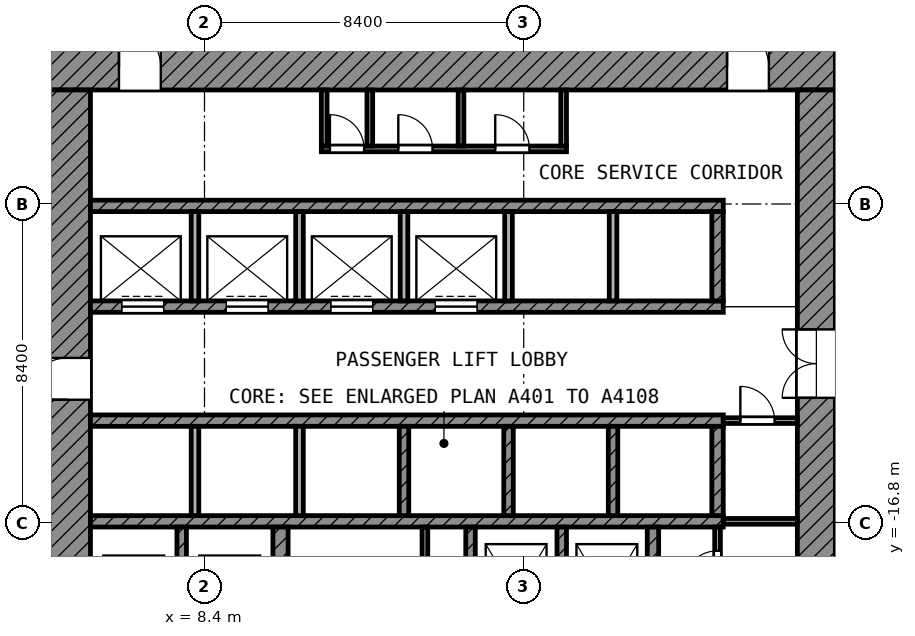
"""IFC4 building model, lengths in metres.
Left out: names, types, materials, properties, quantities, classifications, styles, units other than length and angle.
Written with IfcOpenShell. Run it as: python <this file> out.ifc"""

import sys

from ifc_helpers import new_model, si_unit, direction, frame, frame_2d, origin, place, context, subcontext, project, spatial, rectangle, extrude, element, fill, save


model = new_model("IFC4")
c1 = context("Model", 3, precision=1e-05, world=origin(), true_north=direction((0.0, 1.0)))
c2 = subcontext(c1, "Body", "Model", "MODEL_VIEW")
j1 = project(units=[si_unit("LENGTHUNIT", "METRE"), si_unit("PLANEANGLEUNIT", "RADIAN")], contexts=[c1])
p1 = place(None, origin())
s1 = spatial("IfcSite", under=j1, at=p1, CompositionType="ELEMENT")
p2 = place(p1, origin())
s2 = spatial("IfcBuilding", under=s1, at=p2, CompositionType="ELEMENT")
p3 = place(p2, frame((0.0, 0.0, 93.8)))
s3 = spatial("IfcBuildingStorey", under=s2, at=p3, CompositionType="ELEMENT", Elevation=93.8)
p4 = place(p3, frame((5.45, -0.55, 0.0), z_axis=(0.0, 0.0, 1.0), x_axis=(-0.707106781187, -0.707106781187, 0.0)))
e1 = element("IfcWall", 1, at=p4, inside=s3, PredefinedType="SOLIDWALL", context=c2, shape_type="SweptSolid", body=[
    extrude(rectangle(XDim=6.929, YDim=0.25, at=frame_2d((3.465, 0.0))), origin(), (0.0, 0.0, 1.0), 3.0),
])
p5 = place(p3, frame((4.2, -4.8, 0.0), z_axis=(0.0, 0.0, 1.0), x_axis=(1.0, 0.0, 0.0)))
e2 = element("IfcWall", 2, at=p5, inside=s3, PredefinedType="SHEAR", context=c2, shape_type="SweptSolid", body=[
    extrude(rectangle(XDim=20.8, YDim=1.2, at=frame_2d((10.4, 0.0))), origin(), (0.0, 0.0, 1.0), 4.4),
])
p6 = place(p5, frame((1.95, 0.0, 0.0)))
e3 = element("IfcOpeningElement", 3, at=p6, cuts=e2, PredefinedType="OPENING", context=c2, shape_type="SweptSolid", body=[
    extrude(rectangle(XDim=1.1, YDim=2.1, at=frame_2d((0.55, 1.05))), frame((0.0, 0.61, 0.0), z_axis=(0.0, -1.0, 0.0), x_axis=(1.0, 0.0, 0.0)), (0.0, 0.0, 1.0), 1.22),
])
p7 = place(p5, frame((17.95, 0.0, 0.0)))
e4 = element("IfcOpeningElement", 4, at=p7, cuts=e2, PredefinedType="OPENING", context=c2, shape_type="SweptSolid", body=[
    extrude(rectangle(XDim=1.1, YDim=2.1, at=frame_2d((0.55, 1.05))), frame((0.0, 0.61, 0.0), z_axis=(0.0, -1.0, 0.0), x_axis=(1.0, 0.0, 0.0)), (0.0, 0.0, 1.0), 1.22),
])
p8 = place(p3, frame((4.8, -25.0, 0.0), z_axis=(0.0, 0.0, 1.0), x_axis=(0.0, 1.0, 0.0)))
e5 = element("IfcWall", 5, at=p8, inside=s3, PredefinedType="SHEAR", context=c2, shape_type="SweptSolid", body=[
    extrude(rectangle(XDim=19.6, YDim=1.2, at=frame_2d((9.8, 0.0))), origin(), (0.0, 0.0, 1.0), 4.4),
])
p9 = place(p8, frame((11.45, 0.0, 0.0)))
e6 = element("IfcOpeningElement", 6, at=p9, cuts=e5, PredefinedType="OPENING", context=c2, shape_type="SweptSolid", body=[
    extrude(rectangle(XDim=1.1, YDim=2.1, at=frame_2d((0.55, 1.05))), frame((0.0, 0.61, 0.0), z_axis=(0.0, -1.0, 0.0), x_axis=(1.0, 0.0, 0.0)), (0.0, 0.0, 1.0), 1.22),
])
p10 = place(p8, frame((2.15, 0.0, 0.0)))
e7 = element("IfcOpeningElement", 7, at=p10, cuts=e5, PredefinedType="OPENING", context=c2, shape_type="SweptSolid", body=[
    extrude(rectangle(XDim=1.1, YDim=2.1, at=frame_2d((0.55, 1.05))), frame((0.0, 0.61, 0.0), z_axis=(0.0, -1.0, 0.0), x_axis=(1.0, 0.0, 0.0)), (0.0, 0.0, 1.0), 1.22),
])
p11 = place(p3, frame((24.5, -24.0, 0.0), z_axis=(0.0, 0.0, 1.0), x_axis=(0.0, 1.0, 0.0)))
e8 = element("IfcWall", 8, at=p11, inside=s3, PredefinedType="SHEAR", context=c2, shape_type="SweptSolid", body=[
    extrude(rectangle(XDim=18.6, YDim=1.0, at=frame_2d((9.3, 0.0))), origin(), (0.0, 0.0, 1.0), 4.4),
])
p12 = place(p11, frame((10.5, 0.0, 0.0)))
e9 = element("IfcOpeningElement", 9, at=p12, cuts=e8, PredefinedType="OPENING", context=c2, shape_type="SweptSolid", body=[
    extrude(rectangle(XDim=1.8, YDim=2.1, at=frame_2d((0.9, 1.05))), frame((0.0, 0.51, 0.0), z_axis=(0.0, -1.0, 0.0), x_axis=(1.0, 0.0, 0.0)), (0.0, 0.0, 1.0), 1.02),
])
p13 = place(p3, frame((5.4, -8.45, 0.0), z_axis=(0.0, 0.0, 1.0), x_axis=(1.0, 0.0, 0.0)))
e10 = element("IfcWall", 10, at=p13, inside=s3, PredefinedType="SHEAR", context=c2, shape_type="SweptSolid", body=[
    extrude(rectangle(XDim=16.65, YDim=0.3, at=frame_2d((8.325, 0.0))), origin(), (0.0, 0.0, 1.0), 4.4),
])
p14 = place(p3, frame((5.4, -11.1, 0.0), z_axis=(0.0, 0.0, 1.0), x_axis=(1.0, 0.0, 0.0)))
e11 = element("IfcWall", 11, at=p14, inside=s3, PredefinedType="SHEAR", context=c2, shape_type="SweptSolid", body=[
    extrude(rectangle(XDim=16.65, YDim=0.3, at=frame_2d((8.325, 0.0))), origin(), (0.0, 0.0, 1.0), 4.4),
])
p15 = place(p14, frame((0.825, 0.0, 0.0)))
e12 = element("IfcOpeningElement", 12, at=p15, cuts=e11, PredefinedType="OPENING", context=c2, shape_type="SweptSolid", body=[
    extrude(rectangle(XDim=1.1, YDim=2.1, at=frame_2d((0.55, 1.05))), frame((0.0, 0.16, 0.0), z_axis=(0.0, -1.0, 0.0), x_axis=(1.0, 0.0, 0.0)), (0.0, 0.0, 1.0), 0.32),
])
p16 = place(p14, frame((3.575, 0.0, 0.0)))
e13 = element("IfcOpeningElement", 13, at=p16, cuts=e11, PredefinedType="OPENING", context=c2, shape_type="SweptSolid", body=[
    extrude(rectangle(XDim=1.1, YDim=2.1, at=frame_2d((0.55, 1.05))), frame((0.0, 0.16, 0.0), z_axis=(0.0, -1.0, 0.0), x_axis=(1.0, 0.0, 0.0)), (0.0, 0.0, 1.0), 0.32),
])
p17 = place(p14, frame((6.325, 0.0, 0.0)))
e14 = element("IfcOpeningElement", 14, at=p17, cuts=e11, PredefinedType="OPENING", context=c2, shape_type="SweptSolid", body=[
    extrude(rectangle(XDim=1.1, YDim=2.1, at=frame_2d((0.55, 1.05))), frame((0.0, 0.16, 0.0), z_axis=(0.0, -1.0, 0.0), x_axis=(1.0, 0.0, 0.0)), (0.0, 0.0, 1.0), 0.32),
])
p18 = place(p14, frame((9.075, 0.0, 0.0)))
e15 = element("IfcOpeningElement", 15, at=p18, cuts=e11, PredefinedType="OPENING", context=c2, shape_type="SweptSolid", body=[
    extrude(rectangle(XDim=1.1, YDim=2.1, at=frame_2d((0.55, 1.05))), frame((0.0, 0.16, 0.0), z_axis=(0.0, -1.0, 0.0), x_axis=(1.0, 0.0, 0.0)), (0.0, 0.0, 1.0), 0.32),
])
for number, where, z_axis, x_axis in (
    (16, (5.4, -14.1, 0.0), (0.0, 0.0, 1.0), (1.0, 0.0, 0.0)),
    (17, (5.4, -16.75, 0.0), (0.0, 0.0, 1.0), (1.0, 0.0, 0.0)),
):
    element("IfcWall", number, at=place(p3, frame(where, z_axis=z_axis, x_axis=x_axis)), inside=s3, PredefinedType="SHEAR", context=c2, shape_type="SweptSolid", body=[
        extrude(rectangle(XDim=16.65, YDim=0.3, at=frame_2d((8.325, 0.0))), origin(), (0.0, 0.0, 1.0), 4.4),
    ])
p19 = place(p3, frame((10.4, -20.05, 0.0), z_axis=(0.0, 0.0, 1.0), x_axis=(0.0, 1.0, 0.0)))
e18 = element("IfcWall", 18, at=p19, inside=s3, PredefinedType="SHEAR", context=c2, shape_type="SweptSolid", body=[
    extrude(rectangle(XDim=3.15, YDim=0.4, at=frame_2d((1.575, 0.0))), origin(), (0.0, 0.0, 1.0), 4.4),
])
p20 = place(p3, frame((20.2, -20.35, 0.0), z_axis=(0.0, 0.0, 1.0), x_axis=(0.0, 1.0, 0.0)))
e19 = element("IfcWall", 19, at=p20, inside=s3, PredefinedType="SHEAR", context=c2, shape_type="SweptSolid", body=[
    extrude(rectangle(XDim=3.45, YDim=0.3, at=frame_2d((1.725, 0.0))), origin(), (0.0, 0.0, 1.0), 4.4),
])
p21 = place(p3, frame((21.9, -10.95, 0.0), z_axis=(0.0, 0.0, 1.0), x_axis=(0.0, 1.0, 0.0)))
e20 = element("IfcWall", 20, at=p21, inside=s3, PredefinedType="SHEAR", context=c2, shape_type="SweptSolid", body=[
    extrude(rectangle(XDim=2.35, YDim=0.3, at=frame_2d((1.175, 0.0))), origin(), (0.0, 0.0, 1.0), 4.4),
])
p22 = place(p3, frame((21.9, -16.6, 0.0), z_axis=(0.0, 0.0, 1.0), x_axis=(0.0, 1.0, 0.0)))
e21 = element("IfcWall", 21, at=p22, inside=s3, PredefinedType="SHEAR", context=c2, shape_type="SweptSolid", body=[
    extrude(rectangle(XDim=2.35, YDim=0.3, at=frame_2d((1.175, 0.0))), origin(), (0.0, 0.0, 1.0), 4.4),
])
for number, where, z_axis, x_axis in (
    (22, (7.8, -20.05, 0.0), (0.0, 0.0, 1.0), (0.0, 1.0, 0.0)),
    (23, (15.4, -20.05, 0.0), (0.0, 0.0, 1.0), (0.0, 1.0, 0.0)),
    (24, (17.8, -20.05, 0.0), (0.0, 0.0, 1.0), (0.0, 1.0, 0.0)),
):
    element("IfcWall", number, at=place(p3, frame(where, z_axis=z_axis, x_axis=x_axis)), inside=s3, PredefinedType="SHEAR", context=c2, shape_type="SweptSolid", body=[
        extrude(rectangle(XDim=3.15, YDim=0.25, at=frame_2d((1.575, 0.0))), origin(), (0.0, 0.0, 1.0), 4.4),
    ])
for number, where, z_axis, x_axis in (
    (25, (8.15, -10.95, 0.0), (0.0, 0.0, 1.0), (0.0, 1.0, 0.0)),
    (26, (10.9, -10.95, 0.0), (0.0, 0.0, 1.0), (0.0, 1.0, 0.0)),
    (27, (13.65, -10.95, 0.0), (0.0, 0.0, 1.0), (0.0, 1.0, 0.0)),
    (28, (16.4, -10.95, 0.0), (0.0, 0.0, 1.0), (0.0, 1.0, 0.0)),
    (29, (19.15, -10.95, 0.0), (0.0, 0.0, 1.0), (0.0, 1.0, 0.0)),
):
    element("IfcWall", number, at=place(p3, frame(where, z_axis=z_axis, x_axis=x_axis)), inside=s3, PredefinedType="PARTITIONING", context=c2, shape_type="SweptSolid", body=[
        extrude(rectangle(XDim=2.35, YDim=0.2, at=frame_2d((1.175, 0.0))), origin(), (0.0, 0.0, 1.0), 4.4),
    ])
for number, where, z_axis, x_axis in (
    (30, (8.15, -16.6, 0.0), (0.0, 0.0, 1.0), (0.0, 1.0, 0.0)),
    (31, (10.9, -16.6, 0.0), (0.0, 0.0, 1.0), (0.0, 1.0, 0.0)),
):
    element("IfcWall", number, at=place(p3, frame(where, z_axis=z_axis, x_axis=x_axis)), inside=s3, PredefinedType="PARTITIONING", context=c2, shape_type="SweptSolid", body=[
        extrude(rectangle(XDim=2.35, YDim=0.2, at=frame_2d((1.175, 0.0))), origin(), (0.0, 0.0, 1.0), 4.4),
    ])
for number, where, z_axis, x_axis in (
    (32, (13.65, -16.6, 0.0), (0.0, 0.0, 1.0), (0.0, 1.0, 0.0)),
    (33, (16.4, -16.6, 0.0), (0.0, 0.0, 1.0), (0.0, 1.0, 0.0)),
    (34, (19.15, -16.6, 0.0), (0.0, 0.0, 1.0), (0.0, 1.0, 0.0)),
):
    element("IfcWall", number, at=place(p3, frame(where, z_axis=z_axis, x_axis=x_axis)), inside=s3, PredefinedType="SHEAR", context=c2, shape_type="SweptSolid", body=[
        extrude(rectangle(XDim=2.35, YDim=0.25, at=frame_2d((1.175, 0.0))), origin(), (0.0, 0.0, 1.0), 4.4),
    ])
p23 = place(p3, frame((21.9, -19.05, 0.0), z_axis=(0.0, 0.0, 1.0), x_axis=(0.0, 1.0, 0.0)))
e35 = element("IfcWall", 35, at=p23, inside=s3, PredefinedType="PARTITIONING", context=c2, shape_type="SweptSolid", body=[
    extrude(rectangle(XDim=2.15, YDim=0.15, at=frame_2d((1.075, 0.0))), origin(), (0.0, 0.0, 1.0), 4.4),
])
p24 = place(p23, frame((0.625, 0.0, 0.0)))
e36 = element("IfcOpeningElement", 36, at=p24, cuts=e35, PredefinedType="OPENING", context=c2, shape_type="SweptSolid", body=[
    extrude(rectangle(XDim=0.9, YDim=2.1, at=frame_2d((0.45, 1.05))), frame((0.0, 0.085, 0.0), z_axis=(0.0, -1.0, 0.0), x_axis=(1.0, 0.0, 0.0)), (0.0, 0.0, 1.0), 0.17),
])
p25 = place(p3, frame((22.05, -16.75, 0.0), z_axis=(0.0, 0.0, 1.0), x_axis=(1.0, 0.0, 0.0)))
e37 = element("IfcWall", 37, at=p25, inside=s3, PredefinedType="PARTITIONING", context=c2, shape_type="SweptSolid", body=[
    extrude(rectangle(XDim=1.95, YDim=0.15, at=frame_2d((0.975, 0.0))), origin(), (0.0, 0.0, 1.0), 4.4),
])
p26 = place(p3, frame((22.05, -14.1, 0.0), z_axis=(0.0, 0.0, 1.0), x_axis=(1.0, 0.0, 0.0)))
e38 = element("IfcWall", 38, at=p26, inside=s3, PredefinedType="PARTITIONING", context=c2, shape_type="SweptSolid", body=[
    extrude(rectangle(XDim=1.95, YDim=0.15, at=frame_2d((0.975, 0.0))), origin(), (0.0, 0.0, 1.0), 4.4),
])
p27 = place(p26, frame((0.45, 0.0, 0.0)))
e39 = element("IfcOpeningElement", 39, at=p27, cuts=e38, PredefinedType="OPENING", context=c2, shape_type="SweptSolid", body=[
    extrude(rectangle(XDim=0.9, YDim=2.1, at=frame_2d((0.45, 1.05))), frame((0.0, 0.085, 0.0), z_axis=(0.0, -1.0, 0.0), x_axis=(1.0, 0.0, 0.0)), (0.0, 0.0, 1.0), 0.17),
])
p28 = place(p3, frame((11.475, -6.95, 0.0), z_axis=(0.0, 0.0, 1.0), x_axis=(1.0, 0.0, 0.0)))
e40 = element("IfcWall", 40, at=p28, inside=s3, PredefinedType="PARTITIONING", context=c2, shape_type="SweptSolid", body=[
    extrude(rectangle(XDim=6.45, YDim=0.15, at=frame_2d((3.225, 0.0))), origin(), (0.0, 0.0, 1.0), 4.4),
])
p29 = place(p28, frame((0.225, 0.0, 0.0)))
e41 = element("IfcOpeningElement", 41, at=p29, cuts=e40, PredefinedType="OPENING", context=c2, shape_type="SweptSolid", body=[
    extrude(rectangle(XDim=0.9, YDim=2.1, at=frame_2d((0.45, 1.05))), frame((0.0, 0.085, 0.0), z_axis=(0.0, -1.0, 0.0), x_axis=(1.0, 0.0, 0.0)), (0.0, 0.0, 1.0), 0.17),
])
p30 = place(p28, frame((2.025, 0.0, 0.0)))
e42 = element("IfcOpeningElement", 42, at=p30, cuts=e40, PredefinedType="OPENING", context=c2, shape_type="SweptSolid", body=[
    extrude(rectangle(XDim=0.9, YDim=2.1, at=frame_2d((0.45, 1.05))), frame((0.0, 0.085, 0.0), z_axis=(0.0, -1.0, 0.0), x_axis=(1.0, 0.0, 0.0)), (0.0, 0.0, 1.0), 0.17),
])
p31 = place(p28, frame((4.575, 0.0, 0.0)))
e43 = element("IfcOpeningElement", 43, at=p31, cuts=e40, PredefinedType="OPENING", context=c2, shape_type="SweptSolid", body=[
    extrude(rectangle(XDim=0.9, YDim=2.1, at=frame_2d((0.45, 1.05))), frame((0.0, 0.085, 0.0), z_axis=(0.0, -1.0, 0.0), x_axis=(1.0, 0.0, 0.0)), (0.0, 0.0, 1.0), 0.17),
])
for number, where, z_axis, x_axis in (
    (44, (11.55, -6.875, 0.0), (0.0, 0.0, 1.0), (0.0, 1.0, 0.0)),
    (45, (12.75, -6.875, 0.0), (0.0, 0.0, 1.0), (0.0, 1.0, 0.0)),
):
    element("IfcWall", number, at=place(p3, frame(where, z_axis=z_axis, x_axis=x_axis)), inside=s3, PredefinedType="PARTITIONING", context=c2, shape_type="SweptSolid", body=[
        extrude(rectangle(XDim=1.475, YDim=0.15, at=frame_2d((0.738, 0.0))), origin(), (0.0, 0.0, 1.0), 4.4),
    ])
p32 = place(p3, frame((14.2, -20.05, 0.0), z_axis=(0.0, 0.0, 1.0), x_axis=(0.0, 1.0, 0.0)))
e46 = element("IfcWall", 46, at=p32, inside=s3, PredefinedType="PARTITIONING", context=c2, shape_type="SweptSolid", body=[
    extrude(rectangle(XDim=3.15, YDim=0.15, at=frame_2d((1.575, 0.0))), origin(), (0.0, 0.0, 1.0), 4.4),
])
for number, where, z_axis, x_axis in (
    (47, (15.15, -6.875, 0.0), (0.0, 0.0, 1.0), (0.0, 1.0, 0.0)),
    (48, (17.85, -6.875, 0.0), (0.0, 0.0, 1.0), (0.0, 1.0, 0.0)),
):
    element("IfcWall", number, at=place(p3, frame(where, z_axis=z_axis, x_axis=x_axis)), inside=s3, PredefinedType="PARTITIONING", context=c2, shape_type="SweptSolid", body=[
        extrude(rectangle(XDim=1.475, YDim=0.15, at=frame_2d((0.738, 0.0))), origin(), (0.0, 0.0, 1.0), 4.4),
    ])
p33 = place(p15, origin())
e49 = element("IfcDoor", 49, at=p33, inside=s3, OperationType="DOUBLE_DOOR_SLIDING", PredefinedType="DOOR", context=c2, shape_type="SweptSolid", body=[
    extrude(rectangle(XDim=1.1, YDim=2.1, at=frame_2d((0.55, 1.05))), frame((0.0, 0.025, 0.0), z_axis=(0.0, -1.0, 0.0), x_axis=(1.0, 0.0, 0.0)), (0.0, 0.0, 1.0), 0.05),
])
fill(e12, e49)
p34 = place(p16, origin())
e50 = element("IfcDoor", 50, at=p34, inside=s3, OperationType="DOUBLE_DOOR_SLIDING", PredefinedType="DOOR", context=c2, shape_type="SweptSolid", body=[
    extrude(rectangle(XDim=1.1, YDim=2.1, at=frame_2d((0.55, 1.05))), frame((0.0, 0.025, 0.0), z_axis=(0.0, -1.0, 0.0), x_axis=(1.0, 0.0, 0.0)), (0.0, 0.0, 1.0), 0.05),
])
fill(e13, e50)
p35 = place(p17, origin())
e51 = element("IfcDoor", 51, at=p35, inside=s3, OperationType="DOUBLE_DOOR_SLIDING", PredefinedType="DOOR", context=c2, shape_type="SweptSolid", body=[
    extrude(rectangle(XDim=1.1, YDim=2.1, at=frame_2d((0.55, 1.05))), frame((0.0, 0.025, 0.0), z_axis=(0.0, -1.0, 0.0), x_axis=(1.0, 0.0, 0.0)), (0.0, 0.0, 1.0), 0.05),
])
fill(e14, e51)
p36 = place(p18, origin())
e52 = element("IfcDoor", 52, at=p36, inside=s3, OperationType="DOUBLE_DOOR_SLIDING", PredefinedType="DOOR", context=c2, shape_type="SweptSolid", body=[
    extrude(rectangle(XDim=1.1, YDim=2.1, at=frame_2d((0.55, 1.05))), frame((0.0, 0.025, 0.0), z_axis=(0.0, -1.0, 0.0), x_axis=(1.0, 0.0, 0.0)), (0.0, 0.0, 1.0), 0.05),
])
fill(e15, e52)
p37 = place(p9, origin())
e53 = element("IfcDoor", 53, at=p37, inside=s3, OperationType="SINGLE_SWING_LEFT", PredefinedType="DOOR", context=c2, shape_type="SweptSolid", body=[
    extrude(rectangle(XDim=1.1, YDim=2.1, at=frame_2d((0.55, 1.05))), frame((0.0, 0.025, 0.0), z_axis=(0.0, -1.0, 0.0), x_axis=(1.0, 0.0, 0.0)), (0.0, 0.0, 1.0), 0.05),
])
fill(e6, e53)
p38 = place(p6, origin())
e54 = element("IfcDoor", 54, at=p38, inside=s3, OperationType="SINGLE_SWING_LEFT", PredefinedType="DOOR", context=c2, shape_type="SweptSolid", body=[
    extrude(rectangle(XDim=1.1, YDim=2.1, at=frame_2d((0.55, 1.05))), frame((0.0, 0.025, 0.0), z_axis=(0.0, -1.0, 0.0), x_axis=(1.0, 0.0, 0.0)), (0.0, 0.0, 1.0), 0.05),
])
fill(e3, e54)
p39 = place(p7, origin())
e55 = element("IfcDoor", 55, at=p39, inside=s3, OperationType="SINGLE_SWING_LEFT", PredefinedType="DOOR", context=c2, shape_type="SweptSolid", body=[
    extrude(rectangle(XDim=1.1, YDim=2.1, at=frame_2d((0.55, 1.05))), frame((0.0, 0.025, 0.0), z_axis=(0.0, -1.0, 0.0), x_axis=(1.0, 0.0, 0.0)), (0.0, 0.0, 1.0), 0.05),
])
fill(e4, e55)
p40 = place(p12, origin())
e56 = element("IfcDoor", 56, at=p40, inside=s3, OperationType="DOUBLE_DOOR_SINGLE_SWING", PredefinedType="DOOR", context=c2, shape_type="SweptSolid", body=[
    extrude(rectangle(XDim=1.8, YDim=2.1, at=frame_2d((0.9, 1.05))), frame((0.0, 0.025, 0.0), z_axis=(0.0, -1.0, 0.0), x_axis=(1.0, 0.0, 0.0)), (0.0, 0.0, 1.0), 0.05),
])
fill(e9, e56)
p41 = place(p29, origin())
e57 = element("IfcDoor", 57, at=p41, inside=s3, OperationType="SINGLE_SWING_LEFT", PredefinedType="DOOR", context=c2, shape_type="SweptSolid", body=[
    extrude(rectangle(XDim=0.9, YDim=2.1, at=frame_2d((0.45, 1.05))), frame((0.0, 0.025, 0.0), z_axis=(0.0, -1.0, 0.0), x_axis=(1.0, 0.0, 0.0)), (0.0, 0.0, 1.0), 0.05),
])
fill(e41, e57)
p42 = place(p30, origin())
e58 = element("IfcDoor", 58, at=p42, inside=s3, OperationType="SINGLE_SWING_LEFT", PredefinedType="DOOR", context=c2, shape_type="SweptSolid", body=[
    extrude(rectangle(XDim=0.9, YDim=2.1, at=frame_2d((0.45, 1.05))), frame((0.0, 0.025, 0.0), z_axis=(0.0, -1.0, 0.0), x_axis=(1.0, 0.0, 0.0)), (0.0, 0.0, 1.0), 0.05),
])
fill(e42, e58)
p43 = place(p31, origin())
e59 = element("IfcDoor", 59, at=p43, inside=s3, OperationType="SINGLE_SWING_LEFT", PredefinedType="DOOR", context=c2, shape_type="SweptSolid", body=[
    extrude(rectangle(XDim=0.9, YDim=2.1, at=frame_2d((0.45, 1.05))), frame((0.0, 0.025, 0.0), z_axis=(0.0, -1.0, 0.0), x_axis=(1.0, 0.0, 0.0)), (0.0, 0.0, 1.0), 0.05),
])
fill(e43, e59)
p44 = place(p27, origin())
e60 = element("IfcDoor", 60, at=p44, inside=s3, OperationType="SINGLE_SWING_LEFT", PredefinedType="DOOR", context=c2, shape_type="SweptSolid", body=[
    extrude(rectangle(XDim=0.9, YDim=2.1, at=frame_2d((0.45, 1.05))), frame((0.0, 0.025, 0.0), z_axis=(0.0, -1.0, 0.0), x_axis=(1.0, 0.0, 0.0)), (0.0, 0.0, 1.0), 0.05),
])
fill(e39, e60)
p45 = place(p24, origin())
e61 = element("IfcDoor", 61, at=p45, inside=s3, OperationType="SINGLE_SWING_LEFT", PredefinedType="DOOR", context=c2, shape_type="SweptSolid", body=[
    extrude(rectangle(XDim=0.9, YDim=2.1, at=frame_2d((0.45, 1.05))), frame((0.0, 0.025, 0.0), z_axis=(0.0, -1.0, 0.0), x_axis=(1.0, 0.0, 0.0)), (0.0, 0.0, 1.0), 0.05),
])
fill(e36, e61)
save(model, sys.argv[1])
